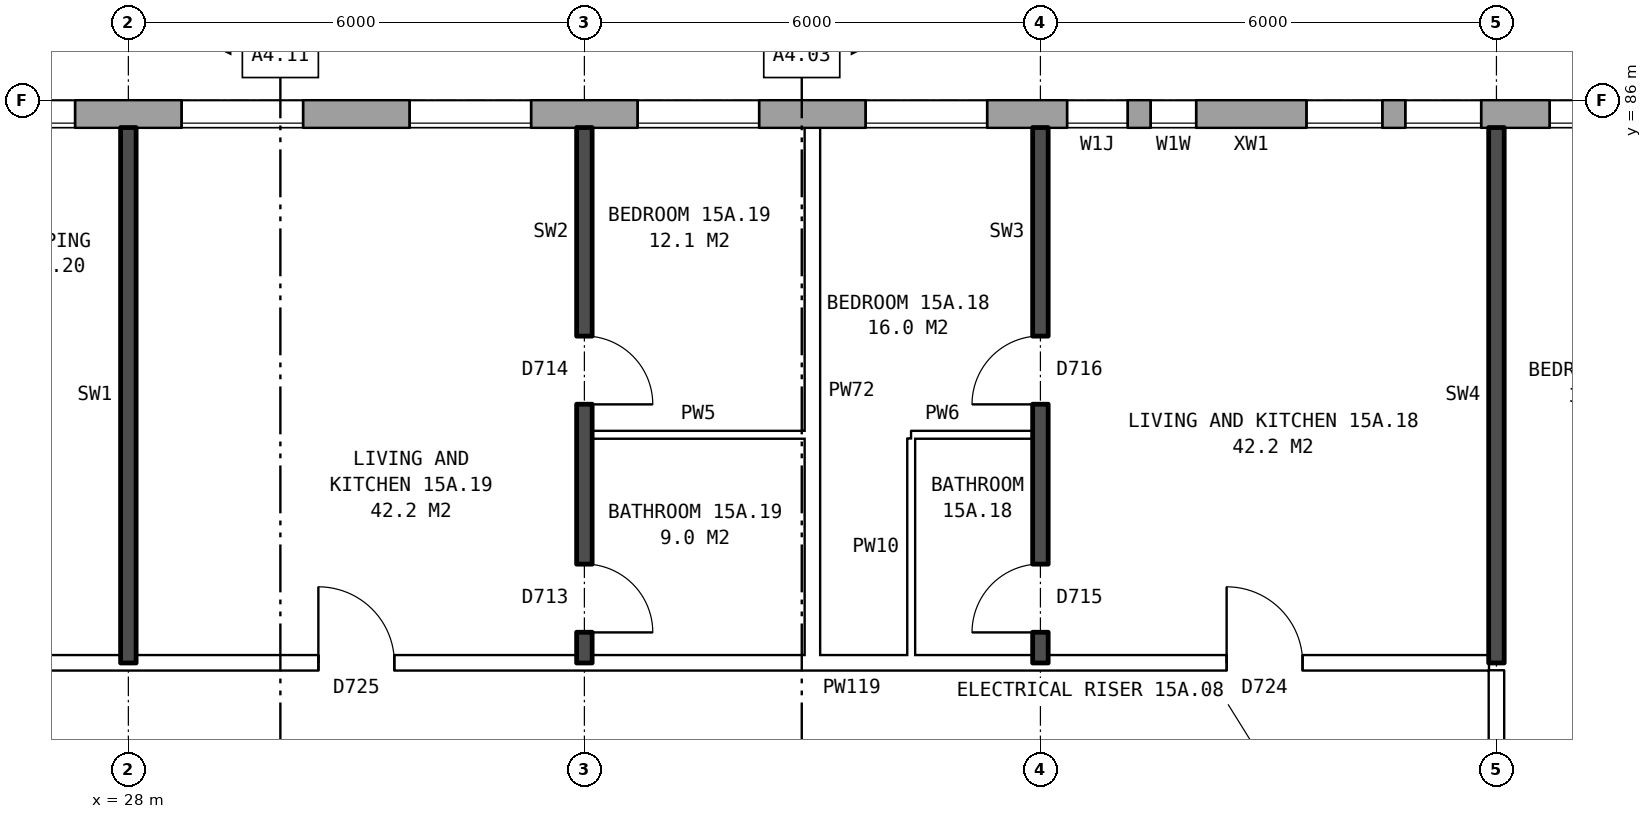
"""IFC4 building model, lengths in metres.
Left out: names, types, materials, properties, quantities, classifications, styles, units other than length and angle.
Written with IfcOpenShell. Run it as: python <this file> out.ifc"""

import sys

from ifc_helpers import new_model, si_unit, direction, frame, frame_2d, origin, place, context, subcontext, project, spatial, rectangle, extrude, element, fill, save


model = new_model("IFC4")
c1 = context("Model", 3, precision=1e-05, world=origin(), true_north=direction((0.0, 1.0)))
c2 = subcontext(c1, "Body", "Model", "MODEL_VIEW")
j1 = project(units=[si_unit("LENGTHUNIT", "METRE"), si_unit("PLANEANGLEUNIT", "RADIAN")], contexts=[c1])
p1 = place(None, origin())
s1 = spatial("IfcSite", under=j1, at=p1, CompositionType="ELEMENT")
p2 = place(p1, origin())
s2 = spatial("IfcBuilding", under=s1, at=p2, CompositionType="ELEMENT")
p3 = place(p2, frame((0.0, 0.0, 56.7)))
s3 = spatial("IfcBuildingStorey", under=s2, at=p3, CompositionType="ELEMENT", Elevation=56.7)
p4 = place(p3, frame((72.925, 85.82, 0.0), z_axis=(0.0, 0.0, 1.0), x_axis=(-1.0, 0.0, 0.0)))
e1 = element("IfcWall", 1, at=p4, inside=s3, PredefinedType="STANDARD", context=c2, shape_type="SweptSolid", body=[
    extrude(rectangle(XDim=48.351, YDim=0.36, at=frame_2d((24.175, 0.0))), origin(), (0.0, 0.0, 1.0), 2.85),
])
p5 = place(p4, frame((0.625, 0.0, 0.8)))
e2 = element("IfcOpeningElement", 2, at=p5, cuts=e1, PredefinedType="OPENING", context=c2, shape_type="SweptSolid", body=[
    extrude(rectangle(XDim=1.6, YDim=1.8, at=frame_2d((0.8, 0.9))), frame((0.0, 0.19, 0.0), z_axis=(0.0, -1.0, 0.0), x_axis=(1.0, 0.0, 0.0)), (0.0, 0.0, 1.0), 0.38),
])
p6 = place(p4, frame((3.625, 0.0, 0.8)))
e3 = element("IfcOpeningElement", 3, at=p6, cuts=e1, PredefinedType="OPENING", context=c2, shape_type="SweptSolid", body=[
    extrude(rectangle(XDim=1.6, YDim=1.8, at=frame_2d((0.8, 0.9))), frame((0.0, 0.19, 0.0), z_axis=(0.0, -1.0, 0.0), x_axis=(1.0, 0.0, 0.0)), (0.0, 0.0, 1.0), 0.38),
])
p7 = place(p4, frame((6.625, 0.0, 0.8)))
e4 = element("IfcOpeningElement", 4, at=p7, cuts=e1, PredefinedType="OPENING", context=c2, shape_type="SweptSolid", body=[
    extrude(rectangle(XDim=1.6, YDim=1.8, at=frame_2d((0.8, 0.9))), frame((0.0, 0.19, 0.0), z_axis=(0.0, -1.0, 0.0), x_axis=(1.0, 0.0, 0.0)), (0.0, 0.0, 1.0), 0.38),
])
p8 = place(p4, frame((9.625, 0.0, 0.8)))
e5 = element("IfcOpeningElement", 5, at=p8, cuts=e1, PredefinedType="OPENING", context=c2, shape_type="SweptSolid", body=[
    extrude(rectangle(XDim=1.6, YDim=1.8, at=frame_2d((0.8, 0.9))), frame((0.0, 0.19, 0.0), z_axis=(0.0, -1.0, 0.0), x_axis=(1.0, 0.0, 0.0)), (0.0, 0.0, 1.0), 0.38),
])
p9 = place(p4, frame((12.625, 0.0, 0.8)))
e6 = element("IfcOpeningElement", 6, at=p9, cuts=e1, PredefinedType="OPENING", context=c2, shape_type="SweptSolid", body=[
    extrude(rectangle(XDim=1.6, YDim=1.8, at=frame_2d((0.8, 0.9))), frame((0.0, 0.19, 0.0), z_axis=(0.0, -1.0, 0.0), x_axis=(1.0, 0.0, 0.0)), (0.0, 0.0, 1.0), 0.38),
])
p10 = place(p4, frame((15.125, 0.0, 0.8)))
e7 = element("IfcOpeningElement", 7, at=p10, cuts=e1, PredefinedType="OPENING", context=c2, shape_type="SweptSolid", body=[
    extrude(rectangle(XDim=1.0, YDim=1.8, at=frame_2d((0.5, 0.9))), frame((0.0, 0.19, 0.0), z_axis=(0.0, -1.0, 0.0), x_axis=(1.0, 0.0, 0.0)), (0.0, 0.0, 1.0), 0.38),
])
p11 = place(p4, frame((18.625, 0.0, 0.65)))
e8 = element("IfcOpeningElement", 8, at=p11, cuts=e1, PredefinedType="OPENING", context=c2, shape_type="SweptSolid", body=[
    extrude(rectangle(XDim=0.8, YDim=0.9, at=frame_2d((0.4, 0.45))), frame((0.0, 0.19, 0.0), z_axis=(0.0, -1.0, 0.0), x_axis=(1.0, 0.0, 0.0)), (0.0, 0.0, 1.0), 0.38),
])
p12 = place(p4, frame((21.625, 0.0, 0.8)))
e9 = element("IfcOpeningElement", 9, at=p12, cuts=e1, PredefinedType="OPENING", context=c2, shape_type="SweptSolid", body=[
    extrude(rectangle(XDim=1.6, YDim=1.8, at=frame_2d((0.8, 0.9))), frame((0.0, 0.19, 0.0), z_axis=(0.0, -1.0, 0.0), x_axis=(1.0, 0.0, 0.0)), (0.0, 0.0, 1.0), 0.38),
])
p13 = place(p4, frame((24.625, 0.0, 0.8)))
e10 = element("IfcOpeningElement", 10, at=p13, cuts=e1, PredefinedType="OPENING", context=c2, shape_type="SweptSolid", body=[
    extrude(rectangle(XDim=1.6, YDim=1.8, at=frame_2d((0.8, 0.9))), frame((0.0, 0.19, 0.0), z_axis=(0.0, -1.0, 0.0), x_axis=(1.0, 0.0, 0.0)), (0.0, 0.0, 1.0), 0.38),
])
p14 = place(p4, frame((27.125, 0.0, 0.8)))
e11 = element("IfcOpeningElement", 11, at=p14, cuts=e1, PredefinedType="OPENING", context=c2, shape_type="SweptSolid", body=[
    extrude(rectangle(XDim=1.0, YDim=1.8, at=frame_2d((0.5, 0.9))), frame((0.0, 0.19, 0.0), z_axis=(0.0, -1.0, 0.0), x_axis=(1.0, 0.0, 0.0)), (0.0, 0.0, 1.0), 0.38),
])
p15 = place(p4, frame((28.425, 0.0, 0.8)))
e12 = element("IfcOpeningElement", 12, at=p15, cuts=e1, PredefinedType="OPENING", context=c2, shape_type="SweptSolid", body=[
    extrude(rectangle(XDim=1.0, YDim=0.9, at=frame_2d((0.5, 0.45))), frame((0.0, 0.19, 0.0), z_axis=(0.0, -1.0, 0.0), x_axis=(1.0, 0.0, 0.0)), (0.0, 0.0, 1.0), 0.38),
])
p16 = place(p4, frame((33.625, 0.0, 0.8)))
e13 = element("IfcOpeningElement", 13, at=p16, cuts=e1, PredefinedType="OPENING", context=c2, shape_type="SweptSolid", body=[
    extrude(rectangle(XDim=1.6, YDim=1.8, at=frame_2d((0.8, 0.9))), frame((0.0, 0.19, 0.0), z_axis=(0.0, -1.0, 0.0), x_axis=(1.0, 0.0, 0.0)), (0.0, 0.0, 1.0), 0.38),
])
p17 = place(p4, frame((36.625, 0.0, 0.8)))
e14 = element("IfcOpeningElement", 14, at=p17, cuts=e1, PredefinedType="OPENING", context=c2, shape_type="SweptSolid", body=[
    extrude(rectangle(XDim=1.6, YDim=1.8, at=frame_2d((0.8, 0.9))), frame((0.0, 0.19, 0.0), z_axis=(0.0, -1.0, 0.0), x_axis=(1.0, 0.0, 0.0)), (0.0, 0.0, 1.0), 0.38),
])
p18 = place(p4, frame((39.625, 0.0, 0.8)))
e15 = element("IfcOpeningElement", 15, at=p18, cuts=e1, PredefinedType="OPENING", context=c2, shape_type="SweptSolid", body=[
    extrude(rectangle(XDim=1.6, YDim=1.8, at=frame_2d((0.8, 0.9))), frame((0.0, 0.19, 0.0), z_axis=(0.0, -1.0, 0.0), x_axis=(1.0, 0.0, 0.0)), (0.0, 0.0, 1.0), 0.38),
])
p19 = place(p4, frame((42.625, 0.0, 0.8)))
e16 = element("IfcOpeningElement", 16, at=p19, cuts=e1, PredefinedType="OPENING", context=c2, shape_type="SweptSolid", body=[
    extrude(rectangle(XDim=1.6, YDim=1.8, at=frame_2d((0.8, 0.9))), frame((0.0, 0.19, 0.0), z_axis=(0.0, -1.0, 0.0), x_axis=(1.0, 0.0, 0.0)), (0.0, 0.0, 1.0), 0.38),
])
p20 = place(p4, frame((45.625, 0.0, 0.8)))
e17 = element("IfcOpeningElement", 17, at=p20, cuts=e1, PredefinedType="OPENING", context=c2, shape_type="SweptSolid", body=[
    extrude(rectangle(XDim=1.6, YDim=1.8, at=frame_2d((0.8, 0.9))), frame((0.0, 0.19, 0.0), z_axis=(0.0, -1.0, 0.0), x_axis=(1.0, 0.0, 0.0)), (0.0, 0.0, 1.0), 0.38),
])
p21 = place(p4, frame((16.425, 0.0, 1.7)))
e18 = element("IfcOpeningElement", 18, at=p21, cuts=e1, PredefinedType="OPENING", context=c2, shape_type="SweptSolid", body=[
    extrude(rectangle(XDim=1.0, YDim=0.9, at=frame_2d((0.5, 0.45))), frame((0.0, 0.19, 0.0), z_axis=(0.0, -1.0, 0.0), x_axis=(1.0, 0.0, 0.0)), (0.0, 0.0, 1.0), 0.38),
])
p22 = place(p4, frame((19.725, 0.0, 0.75)))
e19 = element("IfcOpeningElement", 19, at=p22, cuts=e1, PredefinedType="OPENING", context=c2, shape_type="SweptSolid", body=[
    extrude(rectangle(XDim=1.0, YDim=1.5, at=frame_2d((0.5, 0.75))), frame((0.0, 0.19, 0.0), z_axis=(0.0, -1.0, 0.0), x_axis=(1.0, 0.0, 0.0)), (0.0, 0.0, 1.0), 0.38),
])
p23 = place(p4, frame((30.875, 0.0, 1.7)))
e20 = element("IfcOpeningElement", 20, at=p23, cuts=e1, PredefinedType="OPENING", context=c2, shape_type="SweptSolid", body=[
    extrude(rectangle(XDim=0.6, YDim=0.9, at=frame_2d((0.3, 0.45))), frame((0.0, 0.19, 0.0), z_axis=(0.0, -1.0, 0.0), x_axis=(1.0, 0.0, 0.0)), (0.0, 0.0, 1.0), 0.38),
])
p24 = place(p4, frame((31.775, 0.0, 1.1)))
e21 = element("IfcOpeningElement", 21, at=p24, cuts=e1, PredefinedType="OPENING", context=c2, shape_type="SweptSolid", body=[
    extrude(rectangle(XDim=0.8, YDim=1.5, at=frame_2d((0.4, 0.75))), frame((0.0, 0.19, 0.0), z_axis=(0.0, -1.0, 0.0), x_axis=(1.0, 0.0, 0.0)), (0.0, 0.0, 1.0), 0.38),
])
p25 = place(p3, frame((21.86, 78.6, 0.0), z_axis=(0.0, 0.0, 1.0), x_axis=(1.0, 0.0, 0.0)))
e22 = element("IfcWall", 22, at=p25, inside=s3, PredefinedType="PARTITIONING", context=c2, shape_type="SweptSolid", body=[
    extrude(rectangle(XDim=24.04, YDim=0.2, at=frame_2d((12.02, 0.0))), origin(), (0.0, 0.0, 1.0), 2.85),
])
p26 = place(p25, frame((20.59, 0.0, 0.0)))
e23 = element("IfcOpeningElement", 23, at=p26, cuts=e22, PredefinedType="OPENING", context=c2, shape_type="SweptSolid", body=[
    extrude(rectangle(XDim=1.0, YDim=2.1, at=frame_2d((0.5, 1.05))), frame((0.0, 0.11, 0.0), z_axis=(0.0, -1.0, 0.0), x_axis=(1.0, 0.0, 0.0)), (0.0, 0.0, 1.0), 0.22),
])
p27 = place(p25, frame((8.64, 0.0, 0.0)))
e24 = element("IfcOpeningElement", 24, at=p27, cuts=e22, PredefinedType="OPENING", context=c2, shape_type="SweptSolid", body=[
    extrude(rectangle(XDim=1.0, YDim=2.1, at=frame_2d((0.5, 1.05))), frame((0.0, 0.11, 0.0), z_axis=(0.0, -1.0, 0.0), x_axis=(1.0, 0.0, 0.0)), (0.0, 0.0, 1.0), 0.22),
])
p28 = place(p25, frame((3.64, 0.0, 0.0)))
e25 = element("IfcOpeningElement", 25, at=p28, cuts=e22, PredefinedType="OPENING", context=c2, shape_type="SweptSolid", body=[
    extrude(rectangle(XDim=1.0, YDim=2.1, at=frame_2d((0.5, 1.05))), frame((0.0, 0.11, 0.0), z_axis=(0.0, -1.0, 0.0), x_axis=(1.0, 0.0, 0.0)), (0.0, 0.0, 1.0), 0.22),
])
p29 = place(p3, frame((34.1, 81.6, 0.0), z_axis=(0.0, 0.0, 1.0), x_axis=(1.0, 0.0, 0.0)))
e26 = element("IfcWall", 26, at=p29, inside=s3, PredefinedType="PARTITIONING", context=c2, shape_type="SweptSolid", body=[
    extrude(rectangle(XDim=2.8, YDim=0.1, at=frame_2d((1.4, 0.0))), origin(), (0.0, 0.0, 1.0), 2.85),
])
p30 = place(p3, frame((38.3, 81.6, 0.0), z_axis=(0.0, 0.0, 1.0), x_axis=(1.0, 0.0, 0.0)))
e27 = element("IfcWall", 27, at=p30, inside=s3, PredefinedType="PARTITIONING", context=c2, shape_type="SweptSolid", body=[
    extrude(rectangle(XDim=1.6, YDim=0.1, at=frame_2d((0.8, 0.0))), origin(), (0.0, 0.0, 1.0), 2.85),
])
p31 = place(p3, frame((28.0, 78.6, 0.0), z_axis=(0.0, 0.0, 1.0), x_axis=(0.0, 1.0, 0.0)))
e28 = element("IfcWall", 28, at=p31, inside=s3, PredefinedType="SOLIDWALL", context=c2, shape_type="SweptSolid", body=[
    extrude(rectangle(XDim=7.04, YDim=0.2, at=frame_2d((3.52, 0.0))), origin(), (0.0, 0.0, 1.0), 2.85),
])
p32 = place(p3, frame((34.0, 78.6, 0.0), z_axis=(0.0, 0.0, 1.0), x_axis=(0.0, 1.0, 0.0)))
e29 = element("IfcWall", 29, at=p32, inside=s3, PredefinedType="SOLIDWALL", context=c2, shape_type="SweptSolid", body=[
    extrude(rectangle(XDim=7.04, YDim=0.2, at=frame_2d((3.52, 0.0))), origin(), (0.0, 0.0, 1.0), 2.85),
])
p33 = place(p32, frame((3.4, 0.0, 0.0)))
e30 = element("IfcOpeningElement", 30, at=p33, cuts=e29, PredefinedType="OPENING", context=c2, shape_type="SweptSolid", body=[
    extrude(rectangle(XDim=0.9, YDim=2.1, at=frame_2d((0.45, 1.05))), frame((0.0, 0.11, 0.0), z_axis=(0.0, -1.0, 0.0), x_axis=(1.0, 0.0, 0.0)), (0.0, 0.0, 1.0), 0.22),
])
p34 = place(p32, frame((0.4, 0.0, 0.0)))
e31 = element("IfcOpeningElement", 31, at=p34, cuts=e29, PredefinedType="OPENING", context=c2, shape_type="SweptSolid", body=[
    extrude(rectangle(XDim=0.9, YDim=2.1, at=frame_2d((0.45, 1.05))), frame((0.0, 0.11, 0.0), z_axis=(0.0, -1.0, 0.0), x_axis=(1.0, 0.0, 0.0)), (0.0, 0.0, 1.0), 0.22),
])
p35 = place(p3, frame((37.0, 78.7, 0.0), z_axis=(0.0, 0.0, 1.0), x_axis=(0.0, 1.0, 0.0)))
e32 = element("IfcWall", 32, at=p35, inside=s3, PredefinedType="PARTITIONING", context=c2, shape_type="SweptSolid", body=[
    extrude(rectangle(XDim=6.94, YDim=0.2, at=frame_2d((3.47, 0.0))), origin(), (0.0, 0.0, 1.0), 2.85),
])
p36 = place(p3, frame((38.3, 78.7, 0.0), z_axis=(0.0, 0.0, 1.0), x_axis=(0.0, 1.0, 0.0)))
e33 = element("IfcWall", 33, at=p36, inside=s3, PredefinedType="PARTITIONING", context=c2, shape_type="SweptSolid", body=[
    extrude(rectangle(XDim=2.85, YDim=0.1, at=frame_2d((1.425, 0.0))), origin(), (0.0, 0.0, 1.0), 2.85),
])
p37 = place(p3, frame((40.0, 78.6, 0.0), z_axis=(0.0, 0.0, 1.0), x_axis=(0.0, 1.0, 0.0)))
e34 = element("IfcWall", 34, at=p37, inside=s3, PredefinedType="SOLIDWALL", context=c2, shape_type="SweptSolid", body=[
    extrude(rectangle(XDim=7.04, YDim=0.2, at=frame_2d((3.52, 0.0))), origin(), (0.0, 0.0, 1.0), 2.85),
])
p38 = place(p37, frame((3.4, 0.0, 0.0)))
e35 = element("IfcOpeningElement", 35, at=p38, cuts=e34, PredefinedType="OPENING", context=c2, shape_type="SweptSolid", body=[
    extrude(rectangle(XDim=0.9, YDim=2.1, at=frame_2d((0.45, 1.05))), frame((0.0, 0.11, 0.0), z_axis=(0.0, -1.0, 0.0), x_axis=(1.0, 0.0, 0.0)), (0.0, 0.0, 1.0), 0.22),
])
p39 = place(p37, frame((0.4, 0.0, 0.0)))
e36 = element("IfcOpeningElement", 36, at=p39, cuts=e34, PredefinedType="OPENING", context=c2, shape_type="SweptSolid", body=[
    extrude(rectangle(XDim=0.9, YDim=2.1, at=frame_2d((0.45, 1.05))), frame((0.0, 0.11, 0.0), z_axis=(0.0, -1.0, 0.0), x_axis=(1.0, 0.0, 0.0)), (0.0, 0.0, 1.0), 0.22),
])
p40 = place(p3, frame((46.0, 76.3, 0.0), z_axis=(0.0, 0.0, 1.0), x_axis=(0.0, 1.0, 0.0)))
e37 = element("IfcWall", 37, at=p40, inside=s3, PredefinedType="PARTITIONING", context=c2, shape_type="SweptSolid", body=[
    extrude(rectangle(XDim=2.2, YDim=0.2, at=frame_2d((1.1, 0.0))), origin(), (0.0, 0.0, 1.0), 2.85),
])
p41 = place(p3, frame((46.0, 78.6, 0.0), z_axis=(0.0, 0.0, 1.0), x_axis=(0.0, 1.0, 0.0)))
e38 = element("IfcWall", 38, at=p41, inside=s3, PredefinedType="SOLIDWALL", context=c2, shape_type="SweptSolid", body=[
    extrude(rectangle(XDim=7.04, YDim=0.2, at=frame_2d((3.52, 0.0))), origin(), (0.0, 0.0, 1.0), 2.85),
])
p42 = place(p13, origin())
e39 = element("IfcWindow", 39, at=p42, inside=s3, PartitioningType="SINGLE_PANEL", PredefinedType="WINDOW", context=c2, shape_type="SweptSolid", body=[
    extrude(rectangle(XDim=1.6, YDim=1.8, at=frame_2d((0.8, 0.9))), frame((0.0, 0.15, 0.0), z_axis=(0.0, -1.0, 0.0), x_axis=(1.0, 0.0, 0.0)), (0.0, 0.0, 1.0), 0.06),
])
fill(e10, e39)
p43 = place(p14, origin())
e40 = element("IfcWindow", 40, at=p43, inside=s3, PartitioningType="SINGLE_PANEL", PredefinedType="WINDOW", context=c2, shape_type="SweptSolid", body=[
    extrude(rectangle(XDim=1.0, YDim=1.8, at=frame_2d((0.5, 0.9))), frame((0.0, 0.15, 0.0), z_axis=(0.0, -1.0, 0.0), x_axis=(1.0, 0.0, 0.0)), (0.0, 0.0, 1.0), 0.06),
])
fill(e11, e40)
p44 = place(p15, origin())
e41 = element("IfcWindow", 41, at=p44, inside=s3, PartitioningType="SINGLE_PANEL", PredefinedType="WINDOW", context=c2, shape_type="SweptSolid", body=[
    extrude(rectangle(XDim=1.0, YDim=0.9, at=frame_2d((0.5, 0.45))), frame((0.0, 0.15, 0.0), z_axis=(0.0, -1.0, 0.0), x_axis=(1.0, 0.0, 0.0)), (0.0, 0.0, 1.0), 0.06),
])
fill(e12, e41)
p45 = place(p16, origin())
e42 = element("IfcWindow", 42, at=p45, inside=s3, PartitioningType="SINGLE_PANEL", PredefinedType="WINDOW", context=c2, shape_type="SweptSolid", body=[
    extrude(rectangle(XDim=1.6, YDim=1.8, at=frame_2d((0.8, 0.9))), frame((0.0, 0.15, 0.0), z_axis=(0.0, -1.0, 0.0), x_axis=(1.0, 0.0, 0.0)), (0.0, 0.0, 1.0), 0.06),
])
fill(e13, e42)
p46 = place(p17, origin())
e43 = element("IfcWindow", 43, at=p46, inside=s3, PartitioningType="SINGLE_PANEL", PredefinedType="WINDOW", context=c2, shape_type="SweptSolid", body=[
    extrude(rectangle(XDim=1.6, YDim=1.8, at=frame_2d((0.8, 0.9))), frame((0.0, 0.15, 0.0), z_axis=(0.0, -1.0, 0.0), x_axis=(1.0, 0.0, 0.0)), (0.0, 0.0, 1.0), 0.06),
])
fill(e14, e43)
p47 = place(p18, origin())
e44 = element("IfcWindow", 44, at=p47, inside=s3, PartitioningType="SINGLE_PANEL", PredefinedType="WINDOW", context=c2, shape_type="SweptSolid", body=[
    extrude(rectangle(XDim=1.6, YDim=1.8, at=frame_2d((0.8, 0.9))), frame((0.0, 0.15, 0.0), z_axis=(0.0, -1.0, 0.0), x_axis=(1.0, 0.0, 0.0)), (0.0, 0.0, 1.0), 0.06),
])
fill(e15, e44)
p48 = place(p19, origin())
e45 = element("IfcWindow", 45, at=p48, inside=s3, PartitioningType="SINGLE_PANEL", PredefinedType="WINDOW", context=c2, shape_type="SweptSolid", body=[
    extrude(rectangle(XDim=1.6, YDim=1.8, at=frame_2d((0.8, 0.9))), frame((0.0, 0.15, 0.0), z_axis=(0.0, -1.0, 0.0), x_axis=(1.0, 0.0, 0.0)), (0.0, 0.0, 1.0), 0.06),
])
fill(e16, e45)
p49 = place(p20, origin())
e46 = element("IfcWindow", 46, at=p49, inside=s3, PartitioningType="SINGLE_PANEL", PredefinedType="WINDOW", context=c2, shape_type="SweptSolid", body=[
    extrude(rectangle(XDim=1.6, YDim=1.8, at=frame_2d((0.8, 0.9))), frame((0.0, 0.15, 0.0), z_axis=(0.0, -1.0, 0.0), x_axis=(1.0, 0.0, 0.0)), (0.0, 0.0, 1.0), 0.06),
])
fill(e17, e46)
p50 = place(p38, origin())
e47 = element("IfcDoor", 47, at=p50, inside=s3, OperationType="SINGLE_SWING_LEFT", PredefinedType="DOOR", context=c2, shape_type="SweptSolid", body=[
    extrude(rectangle(XDim=0.9, YDim=2.1, at=frame_2d((0.45, 1.05))), frame((0.0, 0.025, 0.0), z_axis=(0.0, -1.0, 0.0), x_axis=(1.0, 0.0, 0.0)), (0.0, 0.0, 1.0), 0.05),
])
fill(e35, e47)
p51 = place(p26, origin())
e48 = element("IfcDoor", 48, at=p51, inside=s3, OperationType="SINGLE_SWING_LEFT", PredefinedType="DOOR", context=c2, shape_type="SweptSolid", body=[
    extrude(rectangle(XDim=1.0, YDim=2.1, at=frame_2d((0.5, 1.05))), frame((0.0, 0.025, 0.0), z_axis=(0.0, -1.0, 0.0), x_axis=(1.0, 0.0, 0.0)), (0.0, 0.0, 1.0), 0.05),
])
fill(e23, e48)
p52 = place(p39, origin())
e49 = element("IfcDoor", 49, at=p52, inside=s3, OperationType="SINGLE_SWING_LEFT", PredefinedType="DOOR", context=c2, shape_type="SweptSolid", body=[
    extrude(rectangle(XDim=0.9, YDim=2.1, at=frame_2d((0.45, 1.05))), frame((0.0, 0.025, 0.0), z_axis=(0.0, -1.0, 0.0), x_axis=(1.0, 0.0, 0.0)), (0.0, 0.0, 1.0), 0.05),
])
fill(e36, e49)
p53 = place(p33, frame((0.9, 0.0, 0.0), z_axis=(0.0, 0.0, 1.0), x_axis=(-1.0, 0.0, 0.0)))
e50 = element("IfcDoor", 50, at=p53, inside=s3, OperationType="SINGLE_SWING_RIGHT", PredefinedType="DOOR", context=c2, shape_type="SweptSolid", body=[
    extrude(rectangle(XDim=0.9, YDim=2.1, at=frame_2d((0.45, 1.05))), frame((0.0, 0.025, 0.0), z_axis=(0.0, -1.0, 0.0), x_axis=(1.0, 0.0, 0.0)), (0.0, 0.0, 1.0), 0.05),
])
fill(e30, e50)
p54 = place(p27, origin())
e51 = element("IfcDoor", 51, at=p54, inside=s3, OperationType="SINGLE_SWING_LEFT", PredefinedType="DOOR", context=c2, shape_type="SweptSolid", body=[
    extrude(rectangle(XDim=1.0, YDim=2.1, at=frame_2d((0.5, 1.05))), frame((0.0, 0.025, 0.0), z_axis=(0.0, -1.0, 0.0), x_axis=(1.0, 0.0, 0.0)), (0.0, 0.0, 1.0), 0.05),
])
fill(e24, e51)
p55 = place(p34, frame((0.9, 0.0, 0.0), z_axis=(0.0, 0.0, 1.0), x_axis=(-1.0, 0.0, 0.0)))
e52 = element("IfcDoor", 52, at=p55, inside=s3, OperationType="SINGLE_SWING_RIGHT", PredefinedType="DOOR", context=c2, shape_type="SweptSolid", body=[
    extrude(rectangle(XDim=0.9, YDim=2.1, at=frame_2d((0.45, 1.05))), frame((0.0, 0.025, 0.0), z_axis=(0.0, -1.0, 0.0), x_axis=(1.0, 0.0, 0.0)), (0.0, 0.0, 1.0), 0.05),
])
fill(e31, e52)
p56 = place(p23, origin())
e53 = element("IfcWindow", 53, at=p56, inside=s3, PartitioningType="SINGLE_PANEL", PredefinedType="WINDOW", context=c2, shape_type="SweptSolid", body=[
    extrude(rectangle(XDim=0.6, YDim=0.9, at=frame_2d((0.3, 0.45))), frame((0.0, 0.15, 0.0), z_axis=(0.0, -1.0, 0.0), x_axis=(1.0, 0.0, 0.0)), (0.0, 0.0, 1.0), 0.06),
])
fill(e20, e53)
p57 = place(p24, origin())
e54 = element("IfcWindow", 54, at=p57, inside=s3, PartitioningType="SINGLE_PANEL", PredefinedType="WINDOW", context=c2, shape_type="SweptSolid", body=[
    extrude(rectangle(XDim=0.8, YDim=1.5, at=frame_2d((0.4, 0.75))), frame((0.0, 0.15, 0.0), z_axis=(0.0, -1.0, 0.0), x_axis=(1.0, 0.0, 0.0)), (0.0, 0.0, 1.0), 0.06),
])
fill(e21, e54)
save(model, sys.argv[1])
